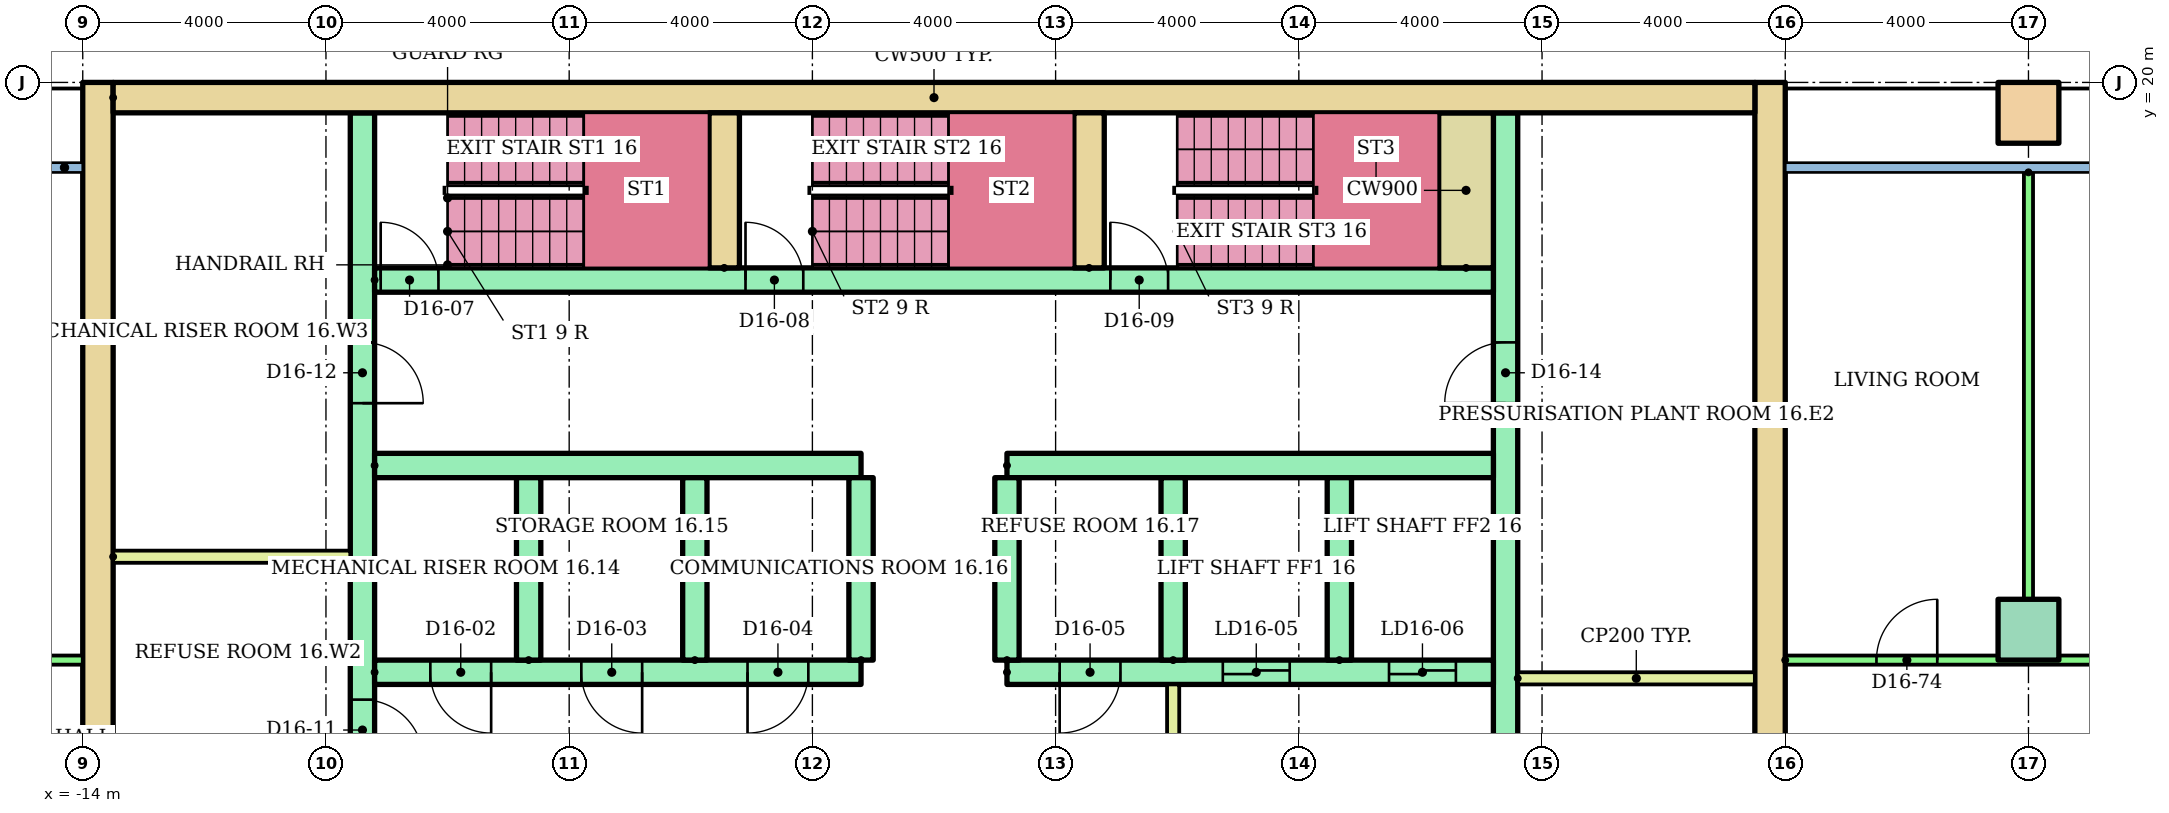
"""IFC4 building model, lengths in metres.
Left out: names, types, materials, properties, quantities, classifications, styles, units other than length and angle.
Written with IfcOpenShell. Run it as: python <this file> out.ifc"""

import sys

from ifc_helpers import new_model, si_unit, direction, frame, frame_2d, origin, origin_2d, place, context, subcontext, project, spatial, rectangle, hollow_rectangle, extrude, element, fill, save


model = new_model("IFC4")
c1 = context("Model", 3, precision=1e-05, world=origin(), true_north=direction((0.0, 1.0)))
c2 = subcontext(c1, "Body", "Model", "MODEL_VIEW")
j1 = project(units=[si_unit("LENGTHUNIT", "METRE"), si_unit("PLANEANGLEUNIT", "RADIAN")], contexts=[c1])
p1 = place(None, origin())
s1 = spatial("IfcSite", under=j1, at=p1, CompositionType="ELEMENT")
p2 = place(p1, origin())
s2 = spatial("IfcBuilding", under=s1, at=p2, CompositionType="ELEMENT")
p3 = place(p2, frame((0.0, 0.0, 60.8)))
s3 = spatial("IfcBuildingStorey", under=s2, at=p3, CompositionType="ELEMENT", Elevation=60.8)
p4 = place(p3, frame((18.0, 11.0, 0.0)))
e1 = element("IfcColumn", 1, at=p4, inside=s3, PredefinedType="COLUMN", context=c2, shape_type="SweptSolid", body=[
    extrude(rectangle(XDim=1.0, YDim=1.0, at=origin_2d()), origin(), (0.0, 0.0, 1.0), 3.2),
])
p5 = place(p3, frame((18.0, 19.5, 0.0)))
e2 = element("IfcColumn", 2, at=p5, inside=s3, PredefinedType="COLUMN", context=c2, shape_type="SweptSolid", body=[
    extrude(hollow_rectangle(XDim=1.0, YDim=1.0, WallThickness=0.05, at=origin_2d()), origin(), (0.0, 0.0, 1.0), 3.2),
])
for number, where, z_axis, x_axis in (
    (3, (-13.75, 3.0, 0.0), (0.0, 0.0, 1.0), (0.0, 1.0, 0.0)),
    (4, (13.75, 3.0, 0.0), (0.0, 0.0, 1.0), (0.0, 1.0, 0.0)),
):
    element("IfcWall", number, at=place(p3, frame(where, z_axis=z_axis, x_axis=x_axis)), inside=s3, PredefinedType="SHEAR", context=c2, shape_type="SweptSolid", body=[
        extrude(rectangle(XDim=17.0, YDim=0.5, at=frame_2d((8.5, 0.0))), origin(), (0.0, 0.0, 1.0), 2.8),
    ])
p6 = place(p3, frame((-13.5, 19.75, 0.0)))
e5 = element("IfcWall", 5, at=p6, inside=s3, PredefinedType="SHEAR", context=c2, shape_type="SweptSolid", body=[
    extrude(rectangle(XDim=27.0, YDim=0.5, at=frame_2d((13.5, 0.0))), origin(), (0.0, 0.0, 1.0), 2.8),
])
p7 = place(p3, frame((-9.4, 6.8, 0.0), z_axis=(0.0, 0.0, 1.0), x_axis=(0.0, 1.0, 0.0)))
e6 = element("IfcWall", 6, at=p7, inside=s3, PredefinedType="SHEAR", context=c2, shape_type="SweptSolid", body=[
    extrude(rectangle(XDim=12.7, YDim=0.4, at=frame_2d((6.35, 0.0))), origin(), (0.0, 0.0, 1.0), 2.8),
])
p8 = place(p7, frame((0.3, 0.0, 0.0)))
e7 = element("IfcOpeningElement", 7, at=p8, cuts=e6, PredefinedType="OPENING", context=c2, shape_type="SweptSolid", body=[
    extrude(rectangle(XDim=1.0, YDim=2.1, at=frame_2d((0.5, 1.05))), frame((0.0, 0.21, 0.0), z_axis=(0.0, -1.0, 0.0), x_axis=(1.0, 0.0, 0.0)), (0.0, 0.0, 1.0), 0.42),
])
p9 = place(p7, frame((2.05, 0.0, 0.0)))
e8 = element("IfcOpeningElement", 8, at=p9, cuts=e6, PredefinedType="OPENING", context=c2, shape_type="SweptSolid", body=[
    extrude(rectangle(XDim=1.0, YDim=2.1, at=frame_2d((0.5, 1.05))), frame((0.0, 0.21, 0.0), z_axis=(0.0, -1.0, 0.0), x_axis=(1.0, 0.0, 0.0)), (0.0, 0.0, 1.0), 0.42),
])
p10 = place(p7, frame((7.925, 0.0, 0.0)))
e9 = element("IfcOpeningElement", 9, at=p10, cuts=e6, PredefinedType="OPENING", context=c2, shape_type="SweptSolid", body=[
    extrude(rectangle(XDim=1.0, YDim=2.1, at=frame_2d((0.5, 1.05))), frame((0.0, 0.21, 0.0), z_axis=(0.0, -1.0, 0.0), x_axis=(1.0, 0.0, 0.0)), (0.0, 0.0, 1.0), 0.42),
])
p11 = place(p3, frame((9.4, 6.8, 0.0), z_axis=(0.0, 0.0, 1.0), x_axis=(0.0, 1.0, 0.0)))
e10 = element("IfcWall", 10, at=p11, inside=s3, PredefinedType="SHEAR", context=c2, shape_type="SweptSolid", body=[
    extrude(rectangle(XDim=12.7, YDim=0.4, at=frame_2d((6.35, 0.0))), origin(), (0.0, 0.0, 1.0), 2.8),
])
p12 = place(p11, frame((1.15, 0.0, 0.0)))
e11 = element("IfcOpeningElement", 11, at=p12, cuts=e10, PredefinedType="OPENING", context=c2, shape_type="SweptSolid", body=[
    extrude(rectangle(XDim=1.0, YDim=2.1, at=frame_2d((0.5, 1.05))), frame((0.0, 0.21, 0.0), z_axis=(0.0, -1.0, 0.0), x_axis=(1.0, 0.0, 0.0)), (0.0, 0.0, 1.0), 0.42),
])
p13 = place(p11, frame((7.925, 0.0, 0.0)))
e12 = element("IfcOpeningElement", 12, at=p13, cuts=e10, PredefinedType="OPENING", context=c2, shape_type="SweptSolid", body=[
    extrude(rectangle(XDim=1.0, YDim=2.1, at=frame_2d((0.5, 1.05))), frame((0.0, 0.21, 0.0), z_axis=(0.0, -1.0, 0.0), x_axis=(1.0, 0.0, 0.0)), (0.0, 0.0, 1.0), 0.42),
])
p14 = place(p3, frame((-9.2, 10.3, 0.0)))
e13 = element("IfcWall", 13, at=p14, inside=s3, PredefinedType="SHEAR", context=c2, shape_type="SweptSolid", body=[
    extrude(rectangle(XDim=8.0, YDim=0.4, at=frame_2d((4.0, 0.0))), origin(), (0.0, 0.0, 1.0), 2.8),
])
p15 = place(p14, frame((0.917, 0.0, 0.0)))
e14 = element("IfcOpeningElement", 14, at=p15, cuts=e13, PredefinedType="OPENING", context=c2, shape_type="SweptSolid", body=[
    extrude(rectangle(XDim=1.0, YDim=2.1, at=frame_2d((0.5, 1.05))), frame((0.0, 0.21, 0.0), z_axis=(0.0, -1.0, 0.0), x_axis=(1.0, 0.0, 0.0)), (0.0, 0.0, 1.0), 0.42),
])
p16 = place(p14, frame((3.4, 0.0, 0.0)))
e15 = element("IfcOpeningElement", 15, at=p16, cuts=e13, PredefinedType="OPENING", context=c2, shape_type="SweptSolid", body=[
    extrude(rectangle(XDim=1.0, YDim=2.1, at=frame_2d((0.5, 1.05))), frame((0.0, 0.21, 0.0), z_axis=(0.0, -1.0, 0.0), x_axis=(1.0, 0.0, 0.0)), (0.0, 0.0, 1.0), 0.42),
])
p17 = place(p14, frame((6.133, 0.0, 0.0)))
e16 = element("IfcOpeningElement", 16, at=p17, cuts=e13, PredefinedType="OPENING", context=c2, shape_type="SweptSolid", body=[
    extrude(rectangle(XDim=1.0, YDim=2.1, at=frame_2d((0.5, 1.05))), frame((0.0, 0.21, 0.0), z_axis=(0.0, -1.0, 0.0), x_axis=(1.0, 0.0, 0.0)), (0.0, 0.0, 1.0), 0.42),
])
p18 = place(p3, frame((-9.2, 13.7, 0.0)))
e17 = element("IfcWall", 17, at=p18, inside=s3, PredefinedType="SHEAR", context=c2, shape_type="SweptSolid", body=[
    extrude(rectangle(XDim=8.0, YDim=0.4, at=frame_2d((4.0, 0.0))), origin(), (0.0, 0.0, 1.0), 2.8),
])
p19 = place(p3, frame((1.2, 10.3, 0.0)))
e18 = element("IfcWall", 18, at=p19, inside=s3, PredefinedType="SHEAR", context=c2, shape_type="SweptSolid", body=[
    extrude(rectangle(XDim=8.0, YDim=0.4, at=frame_2d((4.0, 0.0))), origin(), (0.0, 0.0, 1.0), 2.8),
])
p20 = place(p19, frame((3.55, 0.0, 0.0)))
e19 = element("IfcOpeningElement", 19, at=p20, cuts=e18, PredefinedType="OPENING", context=c2, shape_type="SweptSolid", body=[
    extrude(rectangle(XDim=1.1, YDim=2.1, at=frame_2d((0.55, 1.05))), frame((0.0, 0.21, 0.0), z_axis=(0.0, -1.0, 0.0), x_axis=(1.0, 0.0, 0.0)), (0.0, 0.0, 1.0), 0.42),
])
p21 = place(p19, frame((6.283, 0.0, 0.0)))
e20 = element("IfcOpeningElement", 20, at=p21, cuts=e18, PredefinedType="OPENING", context=c2, shape_type="SweptSolid", body=[
    extrude(rectangle(XDim=1.1, YDim=2.1, at=frame_2d((0.55, 1.05))), frame((0.0, 0.21, 0.0), z_axis=(0.0, -1.0, 0.0), x_axis=(1.0, 0.0, 0.0)), (0.0, 0.0, 1.0), 0.42),
])
p22 = place(p19, frame((0.867, 0.0, 0.0)))
e21 = element("IfcOpeningElement", 21, at=p22, cuts=e18, PredefinedType="OPENING", context=c2, shape_type="SweptSolid", body=[
    extrude(rectangle(XDim=1.0, YDim=2.1, at=frame_2d((0.5, 1.05))), frame((0.0, 0.21, 0.0), z_axis=(0.0, -1.0, 0.0), x_axis=(1.0, 0.0, 0.0)), (0.0, 0.0, 1.0), 0.42),
])
p23 = place(p3, frame((1.2, 13.7, 0.0)))
e22 = element("IfcWall", 22, at=p23, inside=s3, PredefinedType="SHEAR", context=c2, shape_type="SweptSolid", body=[
    extrude(rectangle(XDim=8.0, YDim=0.4, at=frame_2d((4.0, 0.0))), origin(), (0.0, 0.0, 1.0), 2.8),
])
for number, where, z_axis, x_axis in (
    (23, (-6.667, 10.5, 0.0), (0.0, 0.0, 1.0), (0.0, 1.0, 0.0)),
    (24, (-3.933, 10.5, 0.0), (0.0, 0.0, 1.0), (0.0, 1.0, 0.0)),
    (25, (-1.2, 10.5, 0.0), (0.0, 0.0, 1.0), (0.0, 1.0, 0.0)),
    (26, (1.2, 10.5, 0.0), (0.0, 0.0, 1.0), (0.0, 1.0, 0.0)),
    (27, (3.933, 10.5, 0.0), (0.0, 0.0, 1.0), (0.0, 1.0, 0.0)),
    (28, (6.667, 10.5, 0.0), (0.0, 0.0, 1.0), (0.0, 1.0, 0.0)),
):
    element("IfcWall", number, at=place(p3, frame(where, z_axis=z_axis, x_axis=x_axis)), inside=s3, PredefinedType="SHEAR", context=c2, shape_type="SweptSolid", body=[
        extrude(rectangle(XDim=3.0, YDim=0.4, at=frame_2d((1.5, 0.0))), origin(), (0.0, 0.0, 1.0), 2.8),
    ])
p24 = place(p3, frame((3.933, 6.8, 0.0), z_axis=(0.0, 0.0, 1.0), x_axis=(0.0, 1.0, 0.0)))
e29 = element("IfcWall", 29, at=p24, inside=s3, PredefinedType="PARTITIONING", context=c2, shape_type="SweptSolid", body=[
    extrude(rectangle(XDim=3.3, YDim=0.2, at=frame_2d((1.65, 0.0))), origin(), (0.0, 0.0, 1.0), 2.8),
])
p25 = place(p24, frame((1.1, 0.0, 0.0)))
e30 = element("IfcOpeningElement", 30, at=p25, cuts=e29, PredefinedType="OPENING", context=c2, shape_type="SweptSolid", body=[
    extrude(rectangle(XDim=1.1, YDim=2.1, at=frame_2d((0.55, 1.05))), frame((0.0, 0.11, 0.0), z_axis=(0.0, -1.0, 0.0), x_axis=(1.0, 0.0, 0.0)), (0.0, 0.0, 1.0), 0.22),
])
p26 = place(p3, frame((-9.2, 16.75, 0.0)))
e31 = element("IfcWall", 31, at=p26, inside=s3, PredefinedType="SHEAR", context=c2, shape_type="SweptSolid", body=[
    extrude(rectangle(XDim=18.4, YDim=0.4, at=frame_2d((9.2, 0.0))), origin(), (0.0, 0.0, 1.0), 2.8),
])
p27 = place(p26, frame((0.1, 0.0, 0.0)))
e32 = element("IfcOpeningElement", 32, at=p27, cuts=e31, PredefinedType="OPENING", context=c2, shape_type="SweptSolid", body=[
    extrude(rectangle(XDim=0.95, YDim=2.1, at=frame_2d((0.475, 1.05))), frame((0.0, 0.21, 0.0), z_axis=(0.0, -1.0, 0.0), x_axis=(1.0, 0.0, 0.0)), (0.0, 0.0, 1.0), 0.42),
])
p28 = place(p26, frame((6.1, 0.0, 0.0)))
e33 = element("IfcOpeningElement", 33, at=p28, cuts=e31, PredefinedType="OPENING", context=c2, shape_type="SweptSolid", body=[
    extrude(rectangle(XDim=0.95, YDim=2.1, at=frame_2d((0.475, 1.05))), frame((0.0, 0.21, 0.0), z_axis=(0.0, -1.0, 0.0), x_axis=(1.0, 0.0, 0.0)), (0.0, 0.0, 1.0), 0.42),
])
p29 = place(p26, frame((12.1, 0.0, 0.0)))
e34 = element("IfcOpeningElement", 34, at=p29, cuts=e31, PredefinedType="OPENING", context=c2, shape_type="SweptSolid", body=[
    extrude(rectangle(XDim=0.95, YDim=2.1, at=frame_2d((0.475, 1.05))), frame((0.0, 0.21, 0.0), z_axis=(0.0, -1.0, 0.0), x_axis=(1.0, 0.0, 0.0)), (0.0, 0.0, 1.0), 0.42),
])
for number, where, z_axis, x_axis in (
    (35, (-3.45, 16.95, 0.0), (0.0, 0.0, 1.0), (0.0, 1.0, 0.0)),
    (36, (2.55, 16.95, 0.0), (0.0, 0.0, 1.0), (0.0, 1.0, 0.0)),
):
    element("IfcWall", number, at=place(p3, frame(where, z_axis=z_axis, x_axis=x_axis)), inside=s3, PredefinedType="SHEAR", context=c2, shape_type="SweptSolid", body=[
        extrude(rectangle(XDim=2.55, YDim=0.5, at=frame_2d((1.275, 0.0))), origin(), (0.0, 0.0, 1.0), 2.8),
    ])
p30 = place(p3, frame((8.75, 16.95, 0.0), z_axis=(0.0, 0.0, 1.0), x_axis=(0.0, 1.0, 0.0)))
e37 = element("IfcWall", 37, at=p30, inside=s3, PredefinedType="SHEAR", context=c2, shape_type="SweptSolid", body=[
    extrude(rectangle(XDim=2.55, YDim=0.9, at=frame_2d((1.275, 0.0))), origin(), (0.0, 0.0, 1.0), 2.8),
])
for number, where in (
    (38, (-13.5, 12.2, 0.0)),
    (39, (9.6, 10.2, 0.0)),
):
    element("IfcWall", number, at=place(p3, frame(where)), inside=s3, PredefinedType="PARTITIONING", context=c2, shape_type="SweptSolid", body=[
        extrude(rectangle(XDim=3.9, YDim=0.2, at=frame_2d((1.95, 0.0))), origin(), (0.0, 0.0, 1.0), 2.8),
    ])
p31 = place(p3, frame((-22.0, 10.5, 0.0)))
e40 = element("IfcWall", 40, at=p31, inside=s3, PredefinedType="PARTITIONING", context=c2, shape_type="SweptSolid", body=[
    extrude(rectangle(XDim=8.0, YDim=0.15, at=frame_2d((4.0, 0.0))), origin(), (0.0, 0.0, 1.0), 2.4),
])
p32 = place(p31, frame((3.5, 0.0, 0.0)))
e41 = element("IfcOpeningElement", 41, at=p32, cuts=e40, PredefinedType="OPENING", context=c2, shape_type="SweptSolid", body=[
    extrude(rectangle(XDim=1.0, YDim=2.1, at=frame_2d((0.5, 1.05))), frame((0.0, 0.085, 0.0), z_axis=(0.0, -1.0, 0.0), x_axis=(1.0, 0.0, 0.0)), (0.0, 0.0, 1.0), 0.17),
])
p33 = place(p3, frame((14.0, 10.5, 0.0)))
e42 = element("IfcWall", 42, at=p33, inside=s3, PredefinedType="PARTITIONING", context=c2, shape_type="SweptSolid", body=[
    extrude(rectangle(XDim=22.51, YDim=0.15, at=frame_2d((11.255, 0.0))), origin(), (0.0, 0.0, 1.0), 2.4),
])
p34 = place(p33, frame((1.5, 0.0, 0.0)))
e43 = element("IfcOpeningElement", 43, at=p34, cuts=e42, PredefinedType="OPENING", context=c2, shape_type="SweptSolid", body=[
    extrude(rectangle(XDim=1.0, YDim=2.1, at=frame_2d((0.5, 1.05))), frame((0.0, 0.085, 0.0), z_axis=(0.0, -1.0, 0.0), x_axis=(1.0, 0.0, 0.0)), (0.0, 0.0, 1.0), 0.17),
])
p35 = place(p33, frame((7.55, 0.0, 0.0)))
e44 = element("IfcOpeningElement", 44, at=p35, cuts=e42, PredefinedType="OPENING", context=c2, shape_type="SweptSolid", body=[
    extrude(rectangle(XDim=0.9, YDim=2.1, at=frame_2d((0.45, 1.05))), frame((0.0, 0.085, 0.0), z_axis=(0.0, -1.0, 0.0), x_axis=(1.0, 0.0, 0.0)), (0.0, 0.0, 1.0), 0.17),
])
p36 = place(p33, frame((14.45, 0.0, 0.0)))
e45 = element("IfcOpeningElement", 45, at=p36, cuts=e42, PredefinedType="OPENING", context=c2, shape_type="SweptSolid", body=[
    extrude(rectangle(XDim=0.9, YDim=2.1, at=frame_2d((0.45, 1.05))), frame((0.0, 0.085, 0.0), z_axis=(0.0, -1.0, 0.0), x_axis=(1.0, 0.0, 0.0)), (0.0, 0.0, 1.0), 0.17),
])
p37 = place(p33, frame((20.76, 0.0, 0.0)))
e46 = element("IfcOpeningElement", 46, at=p37, cuts=e42, PredefinedType="OPENING", context=c2, shape_type="SweptSolid", body=[
    extrude(rectangle(XDim=0.9, YDim=2.1, at=frame_2d((0.45, 1.05))), frame((0.0, 0.085, 0.0), z_axis=(0.0, -1.0, 0.0), x_axis=(1.0, 0.0, 0.0)), (0.0, 0.0, 1.0), 0.17),
])
p38 = place(p3, frame((18.0, 18.521, 0.0), z_axis=(0.0, 0.0, 1.0), x_axis=(0.0, -1.0, 0.0)))
e47 = element("IfcWall", 47, at=p38, inside=s3, PredefinedType="PARTITIONING", context=c2, shape_type="SweptSolid", body=[
    extrude(rectangle(XDim=8.021, YDim=0.15, at=frame_2d((4.01, 0.0))), origin(), (0.0, 0.0, 1.0), 2.4),
])
p39 = place(p20, origin())
e48 = element("IfcDoor", 48, at=p39, inside=s3, OperationType="SLIDING_TO_LEFT", PredefinedType="DOOR", context=c2, shape_type="SweptSolid", body=[
    extrude(rectangle(XDim=1.1, YDim=2.1, at=frame_2d((0.55, 1.05))), frame((0.0, 0.025, 0.0), z_axis=(0.0, -1.0, 0.0), x_axis=(1.0, 0.0, 0.0)), (0.0, 0.0, 1.0), 0.05),
])
fill(e19, e48)
p40 = place(p21, origin())
e49 = element("IfcDoor", 49, at=p40, inside=s3, OperationType="SLIDING_TO_LEFT", PredefinedType="DOOR", context=c2, shape_type="SweptSolid", body=[
    extrude(rectangle(XDim=1.1, YDim=2.1, at=frame_2d((0.55, 1.05))), frame((0.0, 0.025, 0.0), z_axis=(0.0, -1.0, 0.0), x_axis=(1.0, 0.0, 0.0)), (0.0, 0.0, 1.0), 0.05),
])
fill(e20, e49)
p41 = place(p15, frame((1.0, 0.0, 0.0), z_axis=(0.0, 0.0, 1.0), x_axis=(-1.0, 0.0, 0.0)))
e50 = element("IfcDoor", 50, at=p41, inside=s3, OperationType="SINGLE_SWING_RIGHT", PredefinedType="DOOR", context=c2, shape_type="SweptSolid", body=[
    extrude(rectangle(XDim=1.0, YDim=2.1, at=frame_2d((0.5, 1.05))), frame((0.0, 0.025, 0.0), z_axis=(0.0, -1.0, 0.0), x_axis=(1.0, 0.0, 0.0)), (0.0, 0.0, 1.0), 0.05),
])
fill(e14, e50)
p42 = place(p16, frame((1.0, 0.0, 0.0), z_axis=(0.0, 0.0, 1.0), x_axis=(-1.0, 0.0, 0.0)))
e51 = element("IfcDoor", 51, at=p42, inside=s3, OperationType="SINGLE_SWING_RIGHT", PredefinedType="DOOR", context=c2, shape_type="SweptSolid", body=[
    extrude(rectangle(XDim=1.0, YDim=2.1, at=frame_2d((0.5, 1.05))), frame((0.0, 0.025, 0.0), z_axis=(0.0, -1.0, 0.0), x_axis=(1.0, 0.0, 0.0)), (0.0, 0.0, 1.0), 0.05),
])
fill(e15, e51)
p43 = place(p17, frame((1.0, 0.0, 0.0), z_axis=(0.0, 0.0, 1.0), x_axis=(-1.0, 0.0, 0.0)))
e52 = element("IfcDoor", 52, at=p43, inside=s3, OperationType="SINGLE_SWING_LEFT", PredefinedType="DOOR", context=c2, shape_type="SweptSolid", body=[
    extrude(rectangle(XDim=1.0, YDim=2.1, at=frame_2d((0.5, 1.05))), frame((0.0, 0.025, 0.0), z_axis=(0.0, -1.0, 0.0), x_axis=(1.0, 0.0, 0.0)), (0.0, 0.0, 1.0), 0.05),
])
fill(e16, e52)
p44 = place(p22, frame((1.0, 0.0, 0.0), z_axis=(0.0, 0.0, 1.0), x_axis=(-1.0, 0.0, 0.0)))
e53 = element("IfcDoor", 53, at=p44, inside=s3, OperationType="SINGLE_SWING_LEFT", PredefinedType="DOOR", context=c2, shape_type="SweptSolid", body=[
    extrude(rectangle(XDim=1.0, YDim=2.1, at=frame_2d((0.5, 1.05))), frame((0.0, 0.025, 0.0), z_axis=(0.0, -1.0, 0.0), x_axis=(1.0, 0.0, 0.0)), (0.0, 0.0, 1.0), 0.05),
])
fill(e21, e53)
p45 = place(p27, origin())
e54 = element("IfcDoor", 54, at=p45, inside=s3, OperationType="SINGLE_SWING_LEFT", PredefinedType="DOOR", context=c2, shape_type="SweptSolid", body=[
    extrude(rectangle(XDim=0.95, YDim=2.1, at=frame_2d((0.475, 1.05))), frame((0.0, 0.025, 0.0), z_axis=(0.0, -1.0, 0.0), x_axis=(1.0, 0.0, 0.0)), (0.0, 0.0, 1.0), 0.05),
])
fill(e32, e54)
p46 = place(p28, origin())
e55 = element("IfcDoor", 55, at=p46, inside=s3, OperationType="SINGLE_SWING_LEFT", PredefinedType="DOOR", context=c2, shape_type="SweptSolid", body=[
    extrude(rectangle(XDim=0.95, YDim=2.1, at=frame_2d((0.475, 1.05))), frame((0.0, 0.025, 0.0), z_axis=(0.0, -1.0, 0.0), x_axis=(1.0, 0.0, 0.0)), (0.0, 0.0, 1.0), 0.05),
])
fill(e33, e55)
p47 = place(p29, origin())
e56 = element("IfcDoor", 56, at=p47, inside=s3, OperationType="SINGLE_SWING_LEFT", PredefinedType="DOOR", context=c2, shape_type="SweptSolid", body=[
    extrude(rectangle(XDim=0.95, YDim=2.1, at=frame_2d((0.475, 1.05))), frame((0.0, 0.025, 0.0), z_axis=(0.0, -1.0, 0.0), x_axis=(1.0, 0.0, 0.0)), (0.0, 0.0, 1.0), 0.05),
])
fill(e34, e56)
p48 = place(p9, frame((1.0, 0.0, 0.0), z_axis=(0.0, 0.0, 1.0), x_axis=(-1.0, 0.0, 0.0)))
e57 = element("IfcDoor", 57, at=p48, inside=s3, OperationType="SINGLE_SWING_LEFT", PredefinedType="DOOR", context=c2, shape_type="SweptSolid", body=[
    extrude(rectangle(XDim=1.0, YDim=2.1, at=frame_2d((0.5, 1.05))), frame((0.0, 0.025, 0.0), z_axis=(0.0, -1.0, 0.0), x_axis=(1.0, 0.0, 0.0)), (0.0, 0.0, 1.0), 0.05),
])
fill(e8, e57)
p49 = place(p10, frame((1.0, 0.0, 0.0), z_axis=(0.0, 0.0, 1.0), x_axis=(-1.0, 0.0, 0.0)))
e58 = element("IfcDoor", 58, at=p49, inside=s3, OperationType="SINGLE_SWING_LEFT", PredefinedType="DOOR", context=c2, shape_type="SweptSolid", body=[
    extrude(rectangle(XDim=1.0, YDim=2.1, at=frame_2d((0.5, 1.05))), frame((0.0, 0.025, 0.0), z_axis=(0.0, -1.0, 0.0), x_axis=(1.0, 0.0, 0.0)), (0.0, 0.0, 1.0), 0.05),
])
fill(e9, e58)
p50 = place(p13, origin())
e59 = element("IfcDoor", 59, at=p50, inside=s3, OperationType="SINGLE_SWING_LEFT", PredefinedType="DOOR", context=c2, shape_type="SweptSolid", body=[
    extrude(rectangle(XDim=1.0, YDim=2.1, at=frame_2d((0.5, 1.05))), frame((0.0, 0.025, 0.0), z_axis=(0.0, -1.0, 0.0), x_axis=(1.0, 0.0, 0.0)), (0.0, 0.0, 1.0), 0.05),
])
fill(e12, e59)
p51 = place(p34, origin())
e60 = element("IfcDoor", 60, at=p51, inside=s3, OperationType="SINGLE_SWING_RIGHT", PredefinedType="DOOR", context=c2, shape_type="SweptSolid", body=[
    extrude(rectangle(XDim=1.0, YDim=2.1, at=frame_2d((0.5, 1.05))), frame((0.0, 0.025, 0.0), z_axis=(0.0, -1.0, 0.0), x_axis=(1.0, 0.0, 0.0)), (0.0, 0.0, 1.0), 0.05),
])
fill(e43, e60)
save(model, sys.argv[1])
